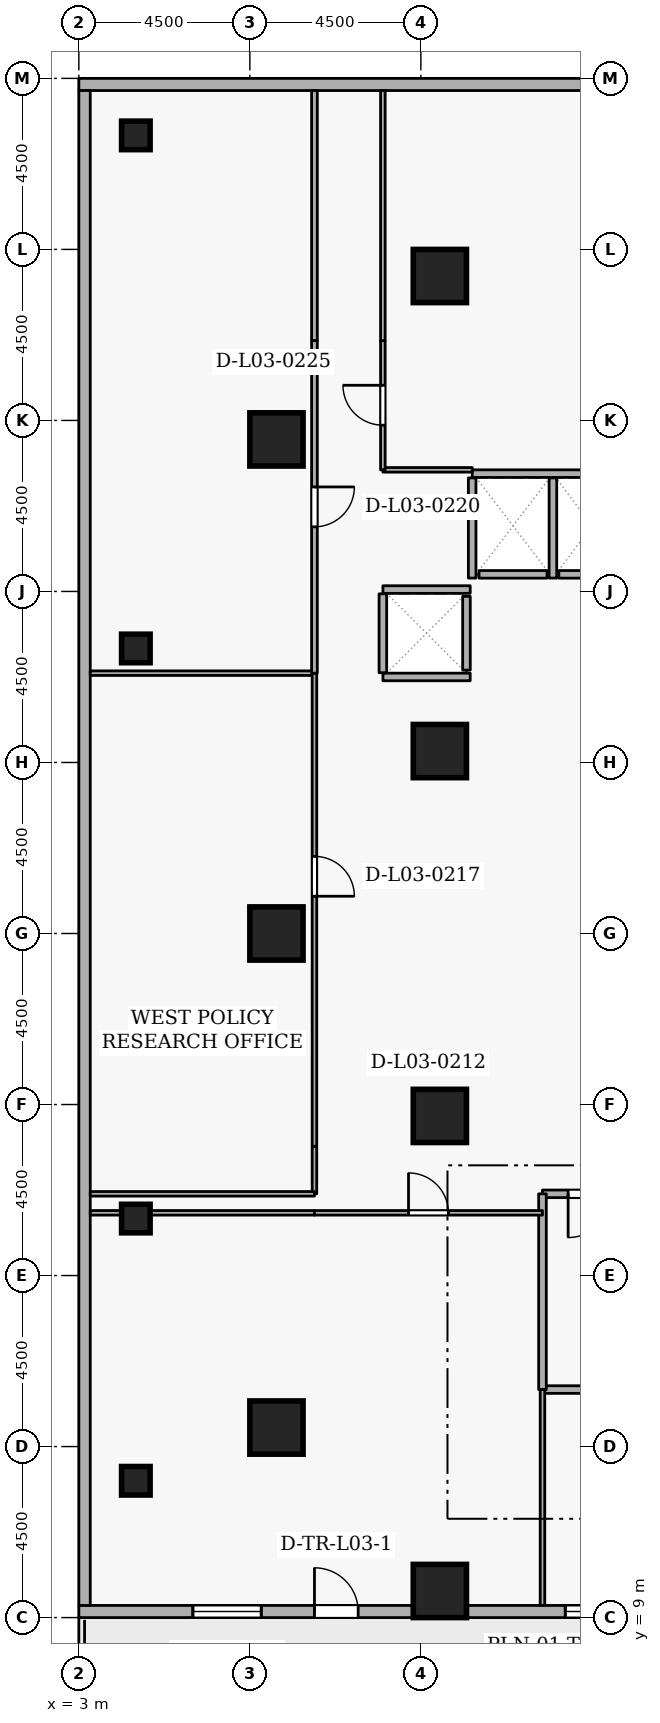
"""IFC4 building model, lengths in metres.
Left out: names, types, materials, properties, quantities, classifications, styles, units other than length and angle.
Written with IfcOpenShell. Run it as: python <this file> out.ifc"""

import sys

from ifc_helpers import new_model, si_unit, direction, frame, frame_2d, origin, origin_2d, place, context, subcontext, project, spatial, rectangle, extrude, element, fill, save


model = new_model("IFC4")
c1 = context("Model", 3, precision=1e-05, world=origin(), true_north=direction((0.0, 1.0)))
c2 = subcontext(c1, "Body", "Model", "MODEL_VIEW")
j1 = project(units=[si_unit("LENGTHUNIT", "METRE"), si_unit("PLANEANGLEUNIT", "RADIAN")], contexts=[c1])
p1 = place(None, origin())
s1 = spatial("IfcSite", under=j1, at=p1, CompositionType="ELEMENT")
p2 = place(p1, origin())
s2 = spatial("IfcBuilding", under=s1, at=p2, CompositionType="ELEMENT")
p3 = place(p2, frame((0.0, 0.0, 14.1)))
s3 = spatial("IfcBuildingStorey", under=s2, at=p3, CompositionType="ELEMENT", Elevation=14.1)
for number, where, z_axis, x_axis in (
    (1, (12.5, 9.7, 0.0), (0.0, 0.0, 1.0), (1.0, 0.0, 0.0)),
    (2, (12.5, 44.3, 0.0), (0.0, 0.0, 1.0), (1.0, 0.0, 0.0)),
    (3, (8.2, 14.0, 0.0), (0.0, 0.0, 1.0), (1.0, 0.0, 0.0)),
    (4, (8.2, 27.0, 0.0), (0.0, 0.0, 1.0), (1.0, 0.0, 0.0)),
    (5, (8.2, 40.0, 0.0), (0.0, 0.0, 1.0), (1.0, 0.0, 0.0)),
    (6, (12.5, 22.2, 0.0), (0.0, 0.0, 1.0), (1.0, 0.0, 0.0)),
    (7, (12.5, 31.8, 0.0), (0.0, 0.0, 1.0), (1.0, 0.0, 0.0)),
):
    element("IfcColumn", number, at=place(p3, frame(where, z_axis=z_axis, x_axis=x_axis)), inside=s3, PredefinedType="COLUMN", context=c2, shape_type="SweptSolid", body=[
        extrude(rectangle(XDim=1.4, YDim=1.4, at=origin_2d()), origin(), (0.0, 0.0, 1.0), 4.5),
    ])
for number, where, z_axis, x_axis in (
    (8, (4.5, 12.6, 0.0), (0.0, 0.0, 1.0), (1.0, 0.0, 0.0)),
    (9, (4.5, 19.5, 0.0), (0.0, 0.0, 1.0), (1.0, 0.0, 0.0)),
    (10, (4.5, 34.5, 0.0), (0.0, 0.0, 1.0), (1.0, 0.0, 0.0)),
    (11, (4.5, 48.0, 0.0), (0.0, 0.0, 1.0), (1.0, 0.0, 0.0)),
):
    element("IfcColumn", number, at=place(p3, frame(where, z_axis=z_axis, x_axis=x_axis)), inside=s3, PredefinedType="COLUMN", context=c2, shape_type="SweptSolid", body=[
        extrude(rectangle(XDim=0.75, YDim=0.75, at=origin_2d()), origin(), (0.0, 0.0, 1.0), 4.5),
    ])
p4 = place(p3, frame((3.0, 9.16, 0.0), z_axis=(0.0, 0.0, 1.0), x_axis=(1.0, 0.0, 0.0)))
e12 = element("IfcWall", 12, at=p4, inside=s3, PredefinedType="STANDARD", context=c2, shape_type="SweptSolid", body=[
    extrude(rectangle(XDim=39.4, YDim=0.32, at=frame_2d((19.7, 0.0))), origin(), (0.0, 0.0, 1.0), 3.56),
])
p5 = place(p4, frame((6.2, 0.0, 0.0)))
e13 = element("IfcOpeningElement", 13, at=p5, cuts=e12, PredefinedType="OPENING", context=c2, shape_type="SweptSolid", body=[
    extrude(rectangle(XDim=1.15, YDim=2.1, at=frame_2d((0.575, 1.05))), frame((0.0, 0.17, 0.0), z_axis=(0.0, -1.0, 0.0), x_axis=(1.0, 0.0, 0.0)), (0.0, 0.0, 1.0), 0.34),
])
p6 = place(p4, frame((3.0, 0.0, 0.78)))
e14 = element("IfcOpeningElement", 14, at=p6, cuts=e12, PredefinedType="OPENING", context=c2, shape_type="SweptSolid", body=[
    extrude(rectangle(XDim=1.8, YDim=2.15, at=frame_2d((0.9, 1.075))), frame((0.0, 0.17, 0.0), z_axis=(0.0, -1.0, 0.0), x_axis=(1.0, 0.0, 0.0)), (0.0, 0.0, 1.0), 0.34),
])
p7 = place(p4, frame((12.8, 0.0, 0.78)))
e15 = element("IfcOpeningElement", 15, at=p7, cuts=e12, PredefinedType="OPENING", context=c2, shape_type="SweptSolid", body=[
    extrude(rectangle(XDim=1.8, YDim=2.15, at=frame_2d((0.9, 1.075))), frame((0.0, 0.17, 0.0), z_axis=(0.0, -1.0, 0.0), x_axis=(1.0, 0.0, 0.0)), (0.0, 0.0, 1.0), 0.34),
])
p8 = place(p4, frame((32.8, 0.0, 0.78)))
e16 = element("IfcOpeningElement", 16, at=p8, cuts=e12, PredefinedType="OPENING", context=c2, shape_type="SweptSolid", body=[
    extrude(rectangle(XDim=1.8, YDim=2.15, at=frame_2d((0.9, 1.075))), frame((0.0, 0.17, 0.0), z_axis=(0.0, -1.0, 0.0), x_axis=(1.0, 0.0, 0.0)), (0.0, 0.0, 1.0), 0.34),
])
p9 = place(p3, frame((42.4, 49.34, 0.0), z_axis=(0.0, 0.0, 1.0), x_axis=(-1.0, 0.0, 0.0)))
e17 = element("IfcWall", 17, at=p9, inside=s3, PredefinedType="STANDARD", context=c2, shape_type="SweptSolid", body=[
    extrude(rectangle(XDim=39.4, YDim=0.32, at=frame_2d((19.7, 0.0))), origin(), (0.0, 0.0, 1.0), 3.56),
])
p10 = place(p9, frame((12.8, 0.0, 0.78)))
e18 = element("IfcOpeningElement", 18, at=p10, cuts=e17, PredefinedType="OPENING", context=c2, shape_type="SweptSolid", body=[
    extrude(rectangle(XDim=1.8, YDim=2.15, at=frame_2d((0.9, 1.075))), frame((0.0, 0.17, 0.0), z_axis=(0.0, -1.0, 0.0), x_axis=(1.0, 0.0, 0.0)), (0.0, 0.0, 1.0), 0.34),
])
p11 = place(p9, frame((22.8, 0.0, 0.78)))
e19 = element("IfcOpeningElement", 19, at=p11, cuts=e17, PredefinedType="OPENING", context=c2, shape_type="SweptSolid", body=[
    extrude(rectangle(XDim=1.8, YDim=2.15, at=frame_2d((0.9, 1.075))), frame((0.0, 0.17, 0.0), z_axis=(0.0, -1.0, 0.0), x_axis=(1.0, 0.0, 0.0)), (0.0, 0.0, 1.0), 0.34),
])
p12 = place(p3, frame((3.15, 49.18, 0.0), z_axis=(0.0, 0.0, 1.0), x_axis=(0.0, -1.0, 0.0)))
e20 = element("IfcWall", 20, at=p12, inside=s3, PredefinedType="STANDARD", context=c2, shape_type="SweptSolid", body=[
    extrude(rectangle(XDim=39.86, YDim=0.3, at=frame_2d((19.93, 0.0))), origin(), (0.0, 0.0, 1.0), 3.56),
])
p13 = place(p3, frame((17.37, 36.45, 0.0), z_axis=(0.0, 0.0, 1.0), x_axis=(-1.0, 0.0, 0.0)))
e21 = element("IfcWall", 21, at=p13, inside=s3, PredefinedType="STANDARD", context=c2, shape_type="SweptSolid", body=[
    extrude(rectangle(XDim=1.74, YDim=0.2, at=frame_2d((0.87, 0.0))), origin(), (0.0, 0.0, 1.0), 4.16),
])
p14 = place(p3, frame((15.32, 36.45, 0.0), z_axis=(0.0, 0.0, 1.0), x_axis=(-1.0, 0.0, 0.0)))
e22 = element("IfcWall", 22, at=p14, inside=s3, PredefinedType="STANDARD", context=c2, shape_type="SweptSolid", body=[
    extrude(rectangle(XDim=1.79, YDim=0.2, at=frame_2d((0.895, 0.0))), origin(), (0.0, 0.0, 1.0), 4.16),
])
p15 = place(p3, frame((13.2, 33.93, 0.0), z_axis=(0.0, 0.0, 1.0), x_axis=(0.0, 1.0, 0.0)))
e23 = element("IfcWall", 23, at=p15, inside=s3, PredefinedType="STANDARD", context=c2, shape_type="SweptSolid", body=[
    extrude(rectangle(XDim=1.94, YDim=0.2, at=frame_2d((0.97, 0.0))), origin(), (0.0, 0.0, 1.0), 4.16),
])
p16 = place(p3, frame((13.352, 39.1, 0.0), z_axis=(0.0, 0.0, 1.0), x_axis=(1.0, 0.0, 0.0)))
e24 = element("IfcWall", 24, at=p16, inside=s3, PredefinedType="STANDARD", context=c2, shape_type="SweptSolid", body=[
    extrude(rectangle(XDim=4.196, YDim=0.2, at=frame_2d((2.098, 0.0))), origin(), (0.0, 0.0, 1.0), 4.16),
])
for number, where, z_axis, x_axis in (
    (25, (15.475, 36.352, 0.0), (0.0, 0.0, 1.0), (0.0, 1.0, 0.0)),
    (26, (13.35, 36.352, 0.0), (0.0, 0.0, 1.0), (0.0, 1.0, 0.0)),
):
    element("IfcWall", number, at=place(p3, frame(where, z_axis=z_axis, x_axis=x_axis)), inside=s3, PredefinedType="STANDARD", context=c2, shape_type="SweptSolid", body=[
        extrude(rectangle(XDim=2.636, YDim=0.2, at=frame_2d((1.318, 0.0))), origin(), (0.0, 0.0, 1.0), 4.16),
    ])
for number, where, z_axis, x_axis in (
    (27, (11.002, 36.05, 0.0), (0.0, 0.0, 1.0), (1.0, 0.0, 0.0)),
    (28, (11.002, 33.75, 0.0), (0.0, 0.0, 1.0), (1.0, 0.0, 0.0)),
):
    element("IfcWall", number, at=place(p3, frame(where, z_axis=z_axis, x_axis=x_axis)), inside=s3, PredefinedType="STANDARD", context=c2, shape_type="SweptSolid", body=[
        extrude(rectangle(XDim=2.296, YDim=0.2, at=frame_2d((1.148, 0.0))), origin(), (0.0, 0.0, 1.0), 4.16),
    ])
p17 = place(p3, frame((11.0, 33.862, 0.0), z_axis=(0.0, 0.0, 1.0), x_axis=(0.0, 1.0, 0.0)))
e29 = element("IfcWall", 29, at=p17, inside=s3, PredefinedType="STANDARD", context=c2, shape_type="SweptSolid", body=[
    extrude(rectangle(XDim=2.076, YDim=0.2, at=frame_2d((1.038, 0.0))), origin(), (0.0, 0.0, 1.0), 4.16),
])
p18 = place(p3, frame((15.2, 15.0, 0.0), z_axis=(0.0, 0.0, 1.0), x_axis=(1.0, 0.0, 0.0)))
e30 = element("IfcWall", 30, at=p18, inside=s3, PredefinedType="STANDARD", context=c2, shape_type="SweptSolid", body=[
    extrude(rectangle(XDim=2.5, YDim=0.2, at=frame_2d((1.25, 0.0))), origin(), (0.0, 0.0, 1.0), 4.16),
])
p19 = place(p3, frame((17.7, 20.15, 0.0), z_axis=(0.0, 0.0, 1.0), x_axis=(-1.0, 0.0, 0.0)))
e31 = element("IfcWall", 31, at=p19, inside=s3, PredefinedType="STANDARD", context=c2, shape_type="SweptSolid", body=[
    extrude(rectangle(XDim=2.5, YDim=0.2, at=frame_2d((1.25, 0.0))), origin(), (0.0, 0.0, 1.0), 4.16),
])
p20 = place(p19, frame((0.675, 0.0, 0.0)))
e32 = element("IfcOpeningElement", 32, at=p20, cuts=e31, PredefinedType="OPENING", context=c2, shape_type="SweptSolid", body=[
    extrude(rectangle(XDim=1.15, YDim=2.1, at=frame_2d((0.575, 1.05))), frame((0.0, 0.11, 0.0), z_axis=(0.0, -1.0, 0.0), x_axis=(1.0, 0.0, 0.0)), (0.0, 0.0, 1.0), 0.22),
])
p21 = place(p3, frame((15.2, 20.15, 0.0), z_axis=(0.0, 0.0, 1.0), x_axis=(0.0, -1.0, 0.0)))
e33 = element("IfcWall", 33, at=p21, inside=s3, PredefinedType="STANDARD", context=c2, shape_type="SweptSolid", body=[
    extrude(rectangle(XDim=5.15, YDim=0.2, at=frame_2d((2.575, 0.0))), origin(), (0.0, 0.0, 1.0), 4.16),
])
p22 = place(p3, frame((3.3, 19.65, 0.0), z_axis=(0.0, 0.0, 1.0), x_axis=(1.0, 0.0, 0.0)))
e34 = element("IfcWall", 34, at=p22, inside=s3, PredefinedType="PARTITIONING", context=c2, shape_type="SweptSolid", body=[
    extrude(rectangle(XDim=5.9, YDim=0.12, at=frame_2d((2.95, 0.0))), origin(), (0.0, 0.0, 1.0), 4.16),
])
p23 = place(p3, frame((9.2, 19.65, 0.0), z_axis=(0.0, 0.0, 1.0), x_axis=(1.0, 0.0, 0.0)))
e35 = element("IfcWall", 35, at=p23, inside=s3, PredefinedType="PARTITIONING", context=c2, shape_type="SweptSolid", body=[
    extrude(rectangle(XDim=6.0, YDim=0.12, at=frame_2d((3.0, 0.0))), origin(), (0.0, 0.0, 1.0), 4.16),
])
p24 = place(p23, frame((2.475, 0.0, 0.0)))
e36 = element("IfcOpeningElement", 36, at=p24, cuts=e35, PredefinedType="OPENING", context=c2, shape_type="SweptSolid", body=[
    extrude(rectangle(XDim=1.05, YDim=2.1, at=frame_2d((0.525, 1.05))), frame((0.0, 0.07, 0.0), z_axis=(0.0, -1.0, 0.0), x_axis=(1.0, 0.0, 0.0)), (0.0, 0.0, 1.0), 0.14),
])
p25 = place(p3, frame((15.2, 15.0, 0.0), z_axis=(0.0, 0.0, 1.0), x_axis=(0.0, -1.0, 0.0)))
e37 = element("IfcWall", 37, at=p25, inside=s3, PredefinedType="PARTITIONING", context=c2, shape_type="SweptSolid", body=[
    extrude(rectangle(XDim=5.68, YDim=0.12, at=frame_2d((2.84, 0.0))), origin(), (0.0, 0.0, 1.0), 4.16),
])
p26 = place(p3, frame((3.3, 33.85, 0.0), z_axis=(0.0, 0.0, 1.0), x_axis=(1.0, 0.0, 0.0)))
e38 = element("IfcWall", 38, at=p26, inside=s3, PredefinedType="PARTITIONING", context=c2, shape_type="SweptSolid", body=[
    extrude(rectangle(XDim=5.9, YDim=0.12, at=frame_2d((2.95, 0.0))), origin(), (0.0, 0.0, 1.0), 4.16),
])
p27 = place(p3, frame((9.2, 33.85, 0.0), z_axis=(0.0, 0.0, 1.0), x_axis=(0.0, -1.0, 0.0)))
e39 = element("IfcWall", 39, at=p27, inside=s3, PredefinedType="PARTITIONING", context=c2, shape_type="SweptSolid", body=[
    extrude(rectangle(XDim=12.45, YDim=0.12, at=frame_2d((6.225, 0.0))), origin(), (0.0, 0.0, 1.0), 4.16),
])
p28 = place(p27, frame((4.82, 0.0, 0.0)))
e40 = element("IfcOpeningElement", 40, at=p28, cuts=e39, PredefinedType="OPENING", context=c2, shape_type="SweptSolid", body=[
    extrude(rectangle(XDim=1.05, YDim=2.1, at=frame_2d((0.525, 1.05))), frame((0.0, 0.07, 0.0), z_axis=(0.0, -1.0, 0.0), x_axis=(1.0, 0.0, 0.0)), (0.0, 0.0, 1.0), 0.14),
])
p29 = place(p3, frame((9.2, 21.4, 0.0), z_axis=(0.0, 0.0, 1.0), x_axis=(0.0, -1.0, 0.0)))
e41 = element("IfcWall", 41, at=p29, inside=s3, PredefinedType="PARTITIONING", context=c2, shape_type="SweptSolid", body=[
    extrude(rectangle(XDim=1.25, YDim=0.12, at=frame_2d((0.625, 0.0))), origin(), (0.0, 0.0, 1.0), 4.16),
])
p30 = place(p3, frame((9.2, 20.15, 0.0), z_axis=(0.0, 0.0, 1.0), x_axis=(-1.0, 0.0, 0.0)))
e42 = element("IfcWall", 42, at=p30, inside=s3, PredefinedType="PARTITIONING", context=c2, shape_type="SweptSolid", body=[
    extrude(rectangle(XDim=5.9, YDim=0.12, at=frame_2d((2.95, 0.0))), origin(), (0.0, 0.0, 1.0), 4.16),
])
p31 = place(p3, frame((9.2, 49.18, 0.0), z_axis=(0.0, 0.0, 1.0), x_axis=(0.0, -1.0, 0.0)))
e43 = element("IfcWall", 43, at=p31, inside=s3, PredefinedType="PARTITIONING", context=c2, shape_type="SweptSolid", body=[
    extrude(rectangle(XDim=6.58, YDim=0.15, at=frame_2d((3.29, 0.0))), origin(), (0.0, 0.0, 1.0), 4.16),
])
p32 = place(p3, frame((9.2, 42.6, 0.0), z_axis=(0.0, 0.0, 1.0), x_axis=(0.0, -1.0, 0.0)))
e44 = element("IfcWall", 44, at=p32, inside=s3, PredefinedType="PARTITIONING", context=c2, shape_type="SweptSolid", body=[
    extrude(rectangle(XDim=8.75, YDim=0.15, at=frame_2d((4.375, 0.0))), origin(), (0.0, 0.0, 1.0), 4.16),
])
p33 = place(p32, frame((3.85, 0.0, 0.0)))
e45 = element("IfcOpeningElement", 45, at=p33, cuts=e44, PredefinedType="OPENING", context=c2, shape_type="SweptSolid", body=[
    extrude(rectangle(XDim=1.05, YDim=2.1, at=frame_2d((0.525, 1.05))), frame((0.0, 0.085, 0.0), z_axis=(0.0, -1.0, 0.0), x_axis=(1.0, 0.0, 0.0)), (0.0, 0.0, 1.0), 0.17),
])
p34 = place(p3, frame((13.352, 39.2, 0.0), z_axis=(0.0, 0.0, 1.0), x_axis=(-1.0, 0.0, 0.0)))
e46 = element("IfcWall", 46, at=p34, inside=s3, PredefinedType="PARTITIONING", context=c2, shape_type="SweptSolid", body=[
    extrude(rectangle(XDim=2.352, YDim=0.12, at=frame_2d((1.176, 0.0))), origin(), (0.0, 0.0, 1.0), 4.16),
])
p35 = place(p3, frame((11.0, 39.2, 0.0), z_axis=(0.0, 0.0, 1.0), x_axis=(0.0, 1.0, 0.0)))
e47 = element("IfcWall", 47, at=p35, inside=s3, PredefinedType="PARTITIONING", context=c2, shape_type="SweptSolid", body=[
    extrude(rectangle(XDim=3.4, YDim=0.12, at=frame_2d((1.7, 0.0))), origin(), (0.0, 0.0, 1.0), 4.16),
])
p36 = place(p35, frame((1.175, 0.0, 0.0)))
e48 = element("IfcOpeningElement", 48, at=p36, cuts=e47, PredefinedType="OPENING", context=c2, shape_type="SweptSolid", body=[
    extrude(rectangle(XDim=1.05, YDim=2.1, at=frame_2d((0.525, 1.05))), frame((0.0, 0.07, 0.0), z_axis=(0.0, -1.0, 0.0), x_axis=(1.0, 0.0, 0.0)), (0.0, 0.0, 1.0), 0.14),
])
p37 = place(p3, frame((11.0, 42.6, 0.0), z_axis=(0.0, 0.0, 1.0), x_axis=(0.0, 1.0, 0.0)))
e49 = element("IfcWall", 49, at=p37, inside=s3, PredefinedType="PARTITIONING", context=c2, shape_type="SweptSolid", body=[
    extrude(rectangle(XDim=6.58, YDim=0.12, at=frame_2d((3.29, 0.0))), origin(), (0.0, 0.0, 1.0), 4.16),
])
p38 = place(p5, origin())
e50 = element("IfcDoor", 50, at=p38, inside=s3, OperationType="SINGLE_SWING_LEFT", PredefinedType="DOOR", context=c2, shape_type="SweptSolid", body=[
    extrude(rectangle(XDim=1.15, YDim=2.1, at=frame_2d((0.575, 1.05))), frame((0.0, 0.025, 0.0), z_axis=(0.0, -1.0, 0.0), x_axis=(1.0, 0.0, 0.0)), (0.0, 0.0, 1.0), 0.05),
])
fill(e13, e50)
p39 = place(p6, origin())
e51 = element("IfcWindow", 51, at=p39, inside=s3, PartitioningType="SINGLE_PANEL", PredefinedType="WINDOW", context=c2, shape_type="SweptSolid", body=[
    extrude(rectangle(XDim=1.8, YDim=2.15, at=frame_2d((0.9, 1.075))), frame((0.0, 0.03, 0.0), z_axis=(0.0, -1.0, 0.0), x_axis=(1.0, 0.0, 0.0)), (0.0, 0.0, 1.0), 0.06),
])
fill(e14, e51)
p40 = place(p7, origin())
e52 = element("IfcWindow", 52, at=p40, inside=s3, PartitioningType="SINGLE_PANEL", PredefinedType="WINDOW", context=c2, shape_type="SweptSolid", body=[
    extrude(rectangle(XDim=1.8, YDim=2.15, at=frame_2d((0.9, 1.075))), frame((0.0, 0.03, 0.0), z_axis=(0.0, -1.0, 0.0), x_axis=(1.0, 0.0, 0.0)), (0.0, 0.0, 1.0), 0.06),
])
fill(e15, e52)
p41 = place(p20, origin())
e53 = element("IfcDoor", 53, at=p41, inside=s3, OperationType="SINGLE_SWING_RIGHT", PredefinedType="DOOR", context=c2, shape_type="SweptSolid", body=[
    extrude(rectangle(XDim=1.15, YDim=2.1, at=frame_2d((0.575, 1.05))), frame((0.0, 0.025, 0.0), z_axis=(0.0, -1.0, 0.0), x_axis=(1.0, 0.0, 0.0)), (0.0, 0.0, 1.0), 0.05),
])
fill(e32, e53)
p42 = place(p24, origin())
e54 = element("IfcDoor", 54, at=p42, inside=s3, OperationType="SINGLE_SWING_LEFT", PredefinedType="DOOR", context=c2, shape_type="SweptSolid", body=[
    extrude(rectangle(XDim=1.05, YDim=2.1, at=frame_2d((0.525, 1.05))), frame((0.0, 0.025, 0.0), z_axis=(0.0, -1.0, 0.0), x_axis=(1.0, 0.0, 0.0)), (0.0, 0.0, 1.0), 0.05),
])
fill(e36, e54)
p43 = place(p28, origin())
e55 = element("IfcDoor", 55, at=p43, inside=s3, OperationType="SINGLE_SWING_RIGHT", PredefinedType="DOOR", context=c2, shape_type="SweptSolid", body=[
    extrude(rectangle(XDim=1.05, YDim=2.1, at=frame_2d((0.525, 1.05))), frame((0.0, 0.025, 0.0), z_axis=(0.0, -1.0, 0.0), x_axis=(1.0, 0.0, 0.0)), (0.0, 0.0, 1.0), 0.05),
])
fill(e40, e55)
p44 = place(p33, origin())
e56 = element("IfcDoor", 56, at=p44, inside=s3, OperationType="SINGLE_SWING_LEFT", PredefinedType="DOOR", context=c2, shape_type="SweptSolid", body=[
    extrude(rectangle(XDim=1.05, YDim=2.1, at=frame_2d((0.525, 1.05))), frame((0.0, 0.025, 0.0), z_axis=(0.0, -1.0, 0.0), x_axis=(1.0, 0.0, 0.0)), (0.0, 0.0, 1.0), 0.05),
])
fill(e45, e56)
p45 = place(p36, origin())
e57 = element("IfcDoor", 57, at=p45, inside=s3, OperationType="SINGLE_SWING_RIGHT", PredefinedType="DOOR", context=c2, shape_type="SweptSolid", body=[
    extrude(rectangle(XDim=1.05, YDim=2.1, at=frame_2d((0.525, 1.05))), frame((0.0, 0.025, 0.0), z_axis=(0.0, -1.0, 0.0), x_axis=(1.0, 0.0, 0.0)), (0.0, 0.0, 1.0), 0.05),
])
fill(e48, e57)
save(model, sys.argv[1])
